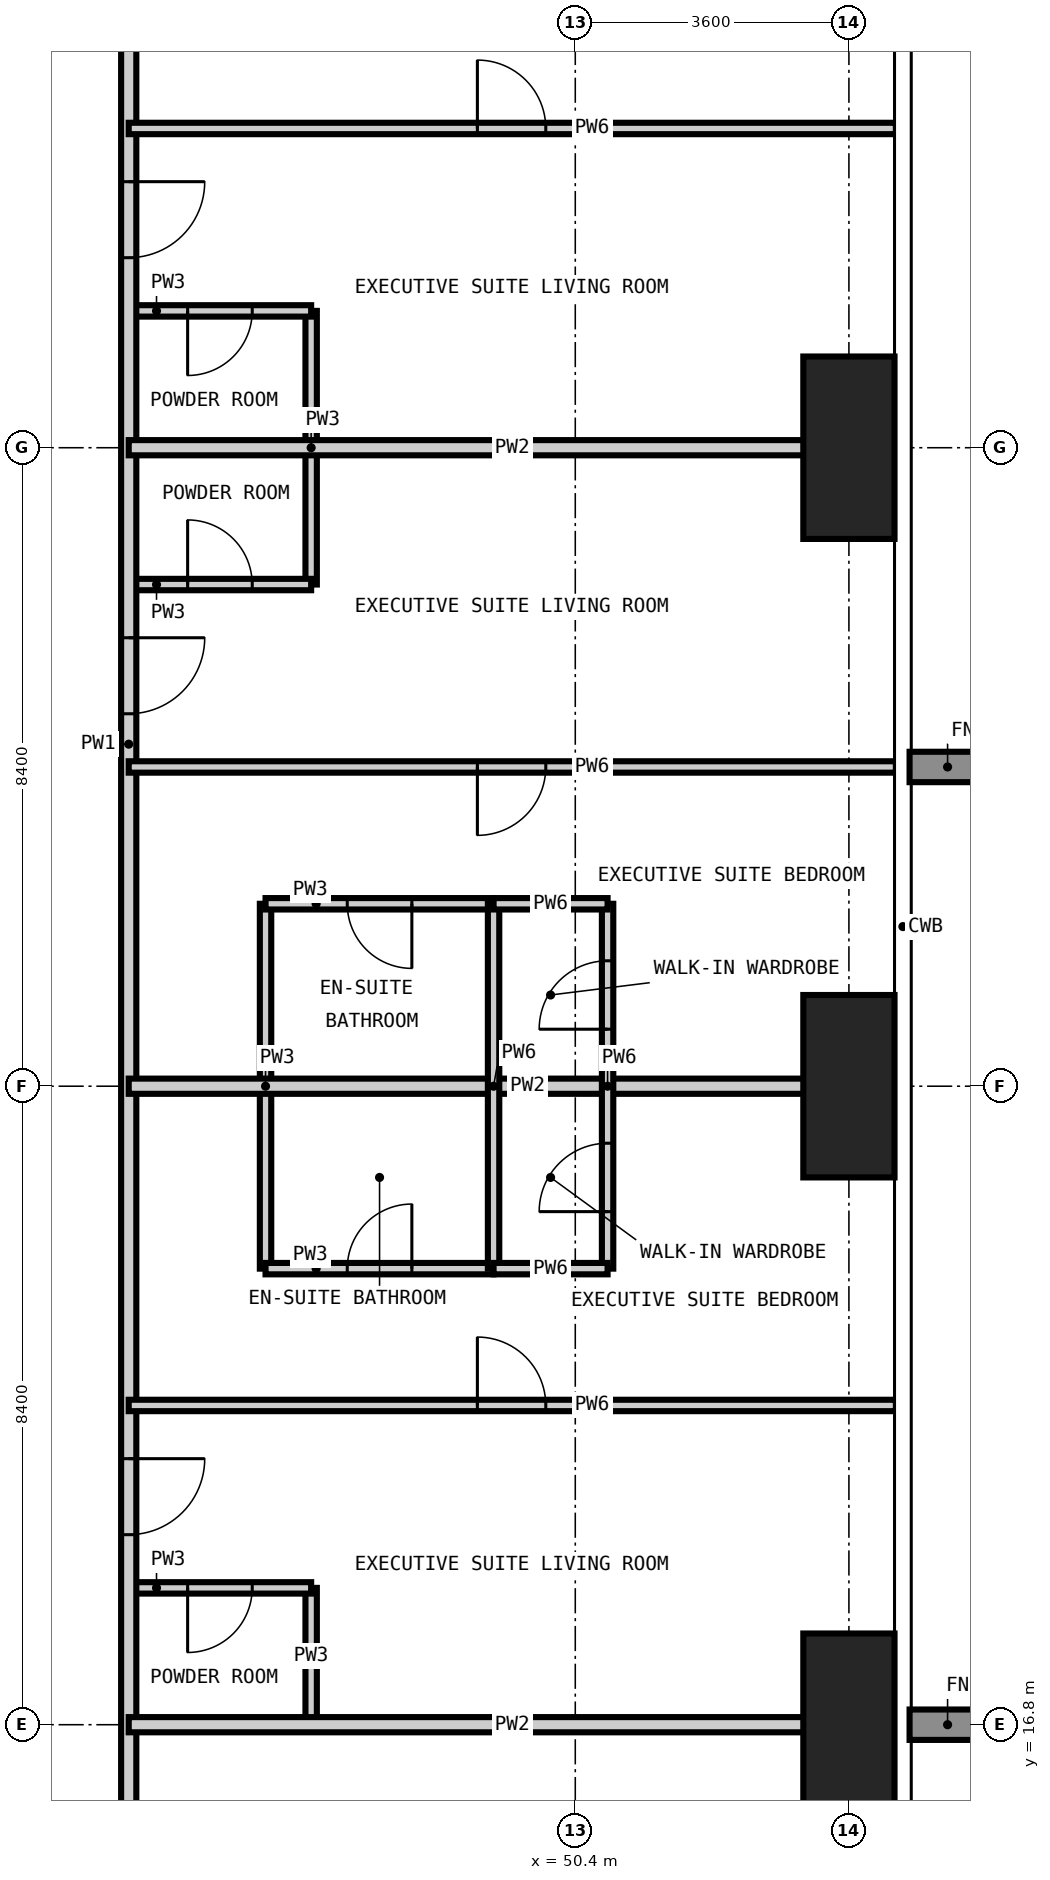
"""IFC4 building model, lengths in metres.
Left out: names, types, materials, properties, quantities, classifications, styles, units other than length and angle.
Written with IfcOpenShell. Run it as: python <this file> out.ifc"""

import sys

from ifc_helpers import new_model, si_unit, direction, frame, frame_2d, origin, origin_2d, place, context, subcontext, project, spatial, rectangle, extrude, element, fill, save


model = new_model("IFC4")
c1 = context("Model", 3, precision=1e-05, world=origin(), true_north=direction((0.0, 1.0)))
c2 = subcontext(c1, "Body", "Model", "MODEL_VIEW")
j1 = project(units=[si_unit("LENGTHUNIT", "METRE"), si_unit("PLANEANGLEUNIT", "RADIAN")], contexts=[c1])
p1 = place(None, origin())
s1 = spatial("IfcSite", under=j1, at=p1, CompositionType="ELEMENT")
p2 = place(p1, origin())
s2 = spatial("IfcBuilding", under=s1, at=p2, CompositionType="ELEMENT")
p3 = place(p2, frame((0.0, 0.0, 122.4)))
s3 = spatial("IfcBuildingStorey", under=s2, at=p3, CompositionType="ELEMENT", Elevation=122.4)
for number, where, z_axis, x_axis in (
    (1, (54.0, 16.8, -0.35), (0.0, 0.0, 1.0), (1.0, 0.0, 0.0)),
    (2, (54.0, 25.2, -0.35), (0.0, 0.0, 1.0), (1.0, 0.0, 0.0)),
    (3, (54.0, 33.6, -0.35), (0.0, 0.0, 1.0), (1.0, 0.0, 0.0)),
):
    element("IfcColumn", number, at=place(p3, frame(where, z_axis=z_axis, x_axis=x_axis)), inside=s3, PredefinedType="COLUMN", context=c2, shape_type="SweptSolid", body=[
        extrude(rectangle(XDim=1.2, YDim=2.4, at=origin_2d()), origin(), (0.0, 0.0, 1.0), 3.6),
    ])
p4 = place(p3, frame((46.325, 22.8, 0.0), z_axis=(0.0, 0.0, 1.0), x_axis=(0.0, 1.0, 0.0)))
e4 = element("IfcWall", 4, at=p4, inside=s3, PredefinedType="PARTITIONING", context=c2, shape_type="SweptSolid", body=[
    extrude(rectangle(XDim=4.8, YDim=0.15, at=frame_2d((2.4, 0.0))), origin(), (0.0, 0.0, 1.0), 3.25),
])
p5 = place(p3, frame((46.925, 16.8, 0.0), z_axis=(0.0, 0.0, 1.0), x_axis=(0.0, 1.0, 0.0)))
e5 = element("IfcWall", 5, at=p5, inside=s3, PredefinedType="PARTITIONING", context=c2, shape_type="SweptSolid", body=[
    extrude(rectangle(XDim=1.8, YDim=0.15, at=frame_2d((0.9, 0.0))), origin(), (0.0, 0.0, 1.0), 3.25),
])
p6 = place(p3, frame((46.925, 31.8, 0.0), z_axis=(0.0, 0.0, 1.0), x_axis=(0.0, 1.0, 0.0)))
e6 = element("IfcWall", 6, at=p6, inside=s3, PredefinedType="PARTITIONING", context=c2, shape_type="SweptSolid", body=[
    extrude(rectangle(XDim=3.6, YDim=0.15, at=frame_2d((1.8, 0.0))), origin(), (0.0, 0.0, 1.0), 3.25),
])
p7 = place(p3, frame((44.525, 18.6, 0.0), z_axis=(0.0, 0.0, 1.0), x_axis=(1.0, 0.0, 0.0)))
e7 = element("IfcWall", 7, at=p7, inside=s3, PredefinedType="PARTITIONING", context=c2, shape_type="SweptSolid", body=[
    extrude(rectangle(XDim=2.4, YDim=0.15, at=frame_2d((1.2, 0.0))), origin(), (0.0, 0.0, 1.0), 3.25),
])
p8 = place(p7, frame((0.775, 0.0, 0.0)))
e8 = element("IfcOpeningElement", 8, at=p8, cuts=e7, PredefinedType="OPENING", context=c2, shape_type="SweptSolid", body=[
    extrude(rectangle(XDim=0.85, YDim=2.1, at=frame_2d((0.425, 1.05))), frame((0.0, 0.085, 0.0), z_axis=(0.0, -1.0, 0.0), x_axis=(1.0, 0.0, 0.0)), (0.0, 0.0, 1.0), 0.17),
])
p9 = place(p3, frame((46.325, 22.8, 0.0), z_axis=(0.0, 0.0, 1.0), x_axis=(1.0, 0.0, 0.0)))
e9 = element("IfcWall", 9, at=p9, inside=s3, PredefinedType="PARTITIONING", context=c2, shape_type="SweptSolid", body=[
    extrude(rectangle(XDim=3.0, YDim=0.15, at=frame_2d((1.5, 0.0))), origin(), (0.0, 0.0, 1.0), 3.25),
])
p10 = place(p9, frame((1.075, 0.0, 0.0)))
e10 = element("IfcOpeningElement", 10, at=p10, cuts=e9, PredefinedType="OPENING", context=c2, shape_type="SweptSolid", body=[
    extrude(rectangle(XDim=0.85, YDim=2.1, at=frame_2d((0.425, 1.05))), frame((0.0, 0.085, 0.0), z_axis=(0.0, -1.0, 0.0), x_axis=(1.0, 0.0, 0.0)), (0.0, 0.0, 1.0), 0.17),
])
p11 = place(p3, frame((46.325, 27.6, 0.0), z_axis=(0.0, 0.0, 1.0), x_axis=(1.0, 0.0, 0.0)))
e11 = element("IfcWall", 11, at=p11, inside=s3, PredefinedType="PARTITIONING", context=c2, shape_type="SweptSolid", body=[
    extrude(rectangle(XDim=3.0, YDim=0.15, at=frame_2d((1.5, 0.0))), origin(), (0.0, 0.0, 1.0), 3.25),
])
p12 = place(p11, frame((1.075, 0.0, 0.0)))
e12 = element("IfcOpeningElement", 12, at=p12, cuts=e11, PredefinedType="OPENING", context=c2, shape_type="SweptSolid", body=[
    extrude(rectangle(XDim=0.85, YDim=2.1, at=frame_2d((0.425, 1.05))), frame((0.0, 0.085, 0.0), z_axis=(0.0, -1.0, 0.0), x_axis=(1.0, 0.0, 0.0)), (0.0, 0.0, 1.0), 0.17),
])
p13 = place(p3, frame((44.525, 31.8, 0.0), z_axis=(0.0, 0.0, 1.0), x_axis=(1.0, 0.0, 0.0)))
e13 = element("IfcWall", 13, at=p13, inside=s3, PredefinedType="PARTITIONING", context=c2, shape_type="SweptSolid", body=[
    extrude(rectangle(XDim=2.4, YDim=0.15, at=frame_2d((1.2, 0.0))), origin(), (0.0, 0.0, 1.0), 3.25),
])
p14 = place(p13, frame((0.775, 0.0, 0.0)))
e14 = element("IfcOpeningElement", 14, at=p14, cuts=e13, PredefinedType="OPENING", context=c2, shape_type="SweptSolid", body=[
    extrude(rectangle(XDim=0.85, YDim=2.1, at=frame_2d((0.425, 1.05))), frame((0.0, 0.085, 0.0), z_axis=(0.0, -1.0, 0.0), x_axis=(1.0, 0.0, 0.0)), (0.0, 0.0, 1.0), 0.17),
])
p15 = place(p3, frame((44.525, 35.4, 0.0), z_axis=(0.0, 0.0, 1.0), x_axis=(1.0, 0.0, 0.0)))
e15 = element("IfcWall", 15, at=p15, inside=s3, PredefinedType="PARTITIONING", context=c2, shape_type="SweptSolid", body=[
    extrude(rectangle(XDim=2.4, YDim=0.15, at=frame_2d((1.2, 0.0))), origin(), (0.0, 0.0, 1.0), 3.25),
])
p16 = place(p15, frame((0.775, 0.0, 0.0)))
e16 = element("IfcOpeningElement", 16, at=p16, cuts=e15, PredefinedType="OPENING", context=c2, shape_type="SweptSolid", body=[
    extrude(rectangle(XDim=0.85, YDim=2.1, at=frame_2d((0.425, 1.05))), frame((0.0, 0.085, 0.0), z_axis=(0.0, -1.0, 0.0), x_axis=(1.0, 0.0, 0.0)), (0.0, 0.0, 1.0), 0.17),
])
p17 = place(p3, frame((44.525, 45.725, 0.0), z_axis=(0.0, 0.0, 1.0), x_axis=(0.0, -1.0, 0.0)))
e17 = element("IfcWall", 17, at=p17, inside=s3, PredefinedType="PARTITIONING", context=c2, shape_type="SweptSolid", body=[
    extrude(rectangle(XDim=32.05, YDim=0.2, at=frame_2d((16.025, 0.0))), origin(), (0.0, 0.0, 1.0), 3.25),
])
p18 = place(p17, frame((25.425, 0.0, 0.0)))
e18 = element("IfcOpeningElement", 18, at=p18, cuts=e17, PredefinedType="OPENING", context=c2, shape_type="SweptSolid", body=[
    extrude(rectangle(XDim=1.0, YDim=2.2, at=frame_2d((0.5, 1.1))), frame((0.0, 0.11, 0.0), z_axis=(0.0, -1.0, 0.0), x_axis=(1.0, 0.0, 0.0)), (0.0, 0.0, 1.0), 0.22),
])
p19 = place(p17, frame((14.625, 0.0, 0.0)))
e19 = element("IfcOpeningElement", 19, at=p19, cuts=e17, PredefinedType="OPENING", context=c2, shape_type="SweptSolid", body=[
    extrude(rectangle(XDim=1.0, YDim=2.2, at=frame_2d((0.5, 1.1))), frame((0.0, 0.11, 0.0), z_axis=(0.0, -1.0, 0.0), x_axis=(1.0, 0.0, 0.0)), (0.0, 0.0, 1.0), 0.22),
])
p20 = place(p17, frame((8.625, 0.0, 0.0)))
e20 = element("IfcOpeningElement", 20, at=p20, cuts=e17, PredefinedType="OPENING", context=c2, shape_type="SweptSolid", body=[
    extrude(rectangle(XDim=1.0, YDim=2.2, at=frame_2d((0.5, 1.1))), frame((0.0, 0.11, 0.0), z_axis=(0.0, -1.0, 0.0), x_axis=(1.0, 0.0, 0.0)), (0.0, 0.0, 1.0), 0.22),
])
p21 = place(p17, frame((29.987, 0.0, 0.0)))
e21 = element("IfcOpeningElement", 21, at=p21, cuts=e17, PredefinedType="OPENING", context=c2, shape_type="SweptSolid", body=[
    extrude(rectangle(XDim=1.0, YDim=2.2, at=frame_2d((0.5, 1.1))), frame((0.0, 0.11, 0.0), z_axis=(0.0, -1.0, 0.0), x_axis=(1.0, 0.0, 0.0)), (0.0, 0.0, 1.0), 0.22),
])
p22 = place(p17, frame((1.363, 0.0, 0.0)))
e22 = element("IfcOpeningElement", 22, at=p22, cuts=e17, PredefinedType="OPENING", context=c2, shape_type="SweptSolid", body=[
    extrude(rectangle(XDim=1.0, YDim=2.2, at=frame_2d((0.5, 1.1))), frame((0.0, 0.11, 0.0), z_axis=(0.0, -1.0, 0.0), x_axis=(1.0, 0.0, 0.0)), (0.0, 0.0, 1.0), 0.22),
])
for number, where, z_axis, x_axis in (
    (23, (44.525, 16.8, 0.0), (0.0, 0.0, 1.0), (1.0, 0.0, 0.0)),
    (24, (44.525, 25.2, 0.0), (0.0, 0.0, 1.0), (1.0, 0.0, 0.0)),
    (25, (44.525, 33.6, 0.0), (0.0, 0.0, 1.0), (1.0, 0.0, 0.0)),
):
    element("IfcWall", number, at=place(p3, frame(where, z_axis=z_axis, x_axis=x_axis)), inside=s3, PredefinedType="PARTITIONING", context=c2, shape_type="SweptSolid", body=[
        extrude(rectangle(XDim=10.093, YDim=0.2, at=frame_2d((5.046, 0.0))), origin(), (0.0, 0.0, 1.0), 3.25),
    ])
p23 = place(p3, frame((49.325, 22.8, 0.0), z_axis=(0.0, 0.0, 1.0), x_axis=(0.0, 1.0, 0.0)))
e26 = element("IfcWall", 26, at=p23, inside=s3, PredefinedType="PARTITIONING", context=c2, shape_type="SweptSolid", body=[
    extrude(rectangle(XDim=4.8, YDim=0.15, at=frame_2d((2.4, 0.0))), origin(), (0.0, 0.0, 1.0), 3.25),
])
p24 = place(p3, frame((50.825, 22.8, 0.0), z_axis=(0.0, 0.0, 1.0), x_axis=(0.0, 1.0, 0.0)))
e27 = element("IfcWall", 27, at=p24, inside=s3, PredefinedType="PARTITIONING", context=c2, shape_type="SweptSolid", body=[
    extrude(rectangle(XDim=4.8, YDim=0.15, at=frame_2d((2.4, 0.0))), origin(), (0.0, 0.0, 1.0), 3.25),
])
p25 = place(p24, frame((0.75, 0.0, 0.0)))
e28 = element("IfcOpeningElement", 28, at=p25, cuts=e27, PredefinedType="OPENING", context=c2, shape_type="SweptSolid", body=[
    extrude(rectangle(XDim=0.9, YDim=2.1, at=frame_2d((0.45, 1.05))), frame((0.0, 0.085, 0.0), z_axis=(0.0, -1.0, 0.0), x_axis=(1.0, 0.0, 0.0)), (0.0, 0.0, 1.0), 0.17),
])
p26 = place(p24, frame((3.15, 0.0, 0.0)))
e29 = element("IfcOpeningElement", 29, at=p26, cuts=e27, PredefinedType="OPENING", context=c2, shape_type="SweptSolid", body=[
    extrude(rectangle(XDim=0.9, YDim=2.1, at=frame_2d((0.45, 1.05))), frame((0.0, 0.085, 0.0), z_axis=(0.0, -1.0, 0.0), x_axis=(1.0, 0.0, 0.0)), (0.0, 0.0, 1.0), 0.17),
])
p27 = place(p3, frame((44.525, 21.0, 0.0), z_axis=(0.0, 0.0, 1.0), x_axis=(1.0, 0.0, 0.0)))
e30 = element("IfcWall", 30, at=p27, inside=s3, PredefinedType="PARTITIONING", context=c2, shape_type="SweptSolid", body=[
    extrude(rectangle(XDim=10.093, YDim=0.15, at=frame_2d((5.046, 0.0))), origin(), (0.0, 0.0, 1.0), 3.25),
])
p28 = place(p27, frame((4.587, 0.0, 0.0)))
e31 = element("IfcOpeningElement", 31, at=p28, cuts=e30, PredefinedType="OPENING", context=c2, shape_type="SweptSolid", body=[
    extrude(rectangle(XDim=0.9, YDim=2.1, at=frame_2d((0.45, 1.05))), frame((0.0, 0.085, 0.0), z_axis=(0.0, -1.0, 0.0), x_axis=(1.0, 0.0, 0.0)), (0.0, 0.0, 1.0), 0.17),
])
for number, where, z_axis, x_axis in (
    (32, (49.325, 22.8, 0.0), (0.0, 0.0, 1.0), (1.0, 0.0, 0.0)),
    (33, (49.325, 27.6, 0.0), (0.0, 0.0, 1.0), (1.0, 0.0, 0.0)),
):
    element("IfcWall", number, at=place(p3, frame(where, z_axis=z_axis, x_axis=x_axis)), inside=s3, PredefinedType="PARTITIONING", context=c2, shape_type="SweptSolid", body=[
        extrude(rectangle(XDim=1.5, YDim=0.15, at=frame_2d((0.75, 0.0))), origin(), (0.0, 0.0, 1.0), 3.25),
    ])
p29 = place(p3, frame((44.525, 29.4, 0.0), z_axis=(0.0, 0.0, 1.0), x_axis=(1.0, 0.0, 0.0)))
e34 = element("IfcWall", 34, at=p29, inside=s3, PredefinedType="PARTITIONING", context=c2, shape_type="SweptSolid", body=[
    extrude(rectangle(XDim=10.093, YDim=0.15, at=frame_2d((5.046, 0.0))), origin(), (0.0, 0.0, 1.0), 3.25),
])
p30 = place(p29, frame((4.587, 0.0, 0.0)))
e35 = element("IfcOpeningElement", 35, at=p30, cuts=e34, PredefinedType="OPENING", context=c2, shape_type="SweptSolid", body=[
    extrude(rectangle(XDim=0.9, YDim=2.1, at=frame_2d((0.45, 1.05))), frame((0.0, 0.085, 0.0), z_axis=(0.0, -1.0, 0.0), x_axis=(1.0, 0.0, 0.0)), (0.0, 0.0, 1.0), 0.17),
])
p31 = place(p3, frame((44.525, 37.8, 0.0), z_axis=(0.0, 0.0, 1.0), x_axis=(1.0, 0.0, 0.0)))
e36 = element("IfcWall", 36, at=p31, inside=s3, PredefinedType="PARTITIONING", context=c2, shape_type="SweptSolid", body=[
    extrude(rectangle(XDim=10.093, YDim=0.15, at=frame_2d((5.046, 0.0))), origin(), (0.0, 0.0, 1.0), 3.25),
])
p32 = place(p31, frame((4.587, 0.0, 0.0)))
e37 = element("IfcOpeningElement", 37, at=p32, cuts=e36, PredefinedType="OPENING", context=c2, shape_type="SweptSolid", body=[
    extrude(rectangle(XDim=0.9, YDim=2.1, at=frame_2d((0.45, 1.05))), frame((0.0, 0.085, 0.0), z_axis=(0.0, -1.0, 0.0), x_axis=(1.0, 0.0, 0.0)), (0.0, 0.0, 1.0), 0.17),
])
p33 = place(p18, origin())
e38 = element("IfcDoor", 38, at=p33, inside=s3, OperationType="SINGLE_SWING_LEFT", PredefinedType="DOOR", context=c2, shape_type="SweptSolid", body=[
    extrude(rectangle(XDim=1.0, YDim=2.2, at=frame_2d((0.5, 1.1))), frame((0.0, 0.025, 0.0), z_axis=(0.0, -1.0, 0.0), x_axis=(1.0, 0.0, 0.0)), (0.0, 0.0, 1.0), 0.05),
])
fill(e18, e38)
p34 = place(p8, frame((0.85, 0.0, 0.0), z_axis=(0.0, 0.0, 1.0), x_axis=(-1.0, 0.0, 0.0)))
e39 = element("IfcDoor", 39, at=p34, inside=s3, OperationType="SINGLE_SWING_RIGHT", PredefinedType="DOOR", context=c2, shape_type="SweptSolid", body=[
    extrude(rectangle(XDim=0.85, YDim=2.1, at=frame_2d((0.425, 1.05))), frame((0.0, 0.025, 0.0), z_axis=(0.0, -1.0, 0.0), x_axis=(1.0, 0.0, 0.0)), (0.0, 0.0, 1.0), 0.05),
])
fill(e8, e39)
p35 = place(p28, origin())
e40 = element("IfcDoor", 40, at=p35, inside=s3, OperationType="SINGLE_SWING_LEFT", PredefinedType="DOOR", context=c2, shape_type="SweptSolid", body=[
    extrude(rectangle(XDim=0.9, YDim=2.1, at=frame_2d((0.45, 1.05))), frame((0.0, 0.025, 0.0), z_axis=(0.0, -1.0, 0.0), x_axis=(1.0, 0.0, 0.0)), (0.0, 0.0, 1.0), 0.05),
])
fill(e31, e40)
p36 = place(p10, origin())
e41 = element("IfcDoor", 41, at=p36, inside=s3, OperationType="SINGLE_SWING_RIGHT", PredefinedType="DOOR", context=c2, shape_type="SweptSolid", body=[
    extrude(rectangle(XDim=0.85, YDim=2.1, at=frame_2d((0.425, 1.05))), frame((0.0, 0.025, 0.0), z_axis=(0.0, -1.0, 0.0), x_axis=(1.0, 0.0, 0.0)), (0.0, 0.0, 1.0), 0.05),
])
fill(e10, e41)
p37 = place(p25, origin())
e42 = element("IfcDoor", 42, at=p37, inside=s3, OperationType="SINGLE_SWING_LEFT", PredefinedType="DOOR", context=c2, shape_type="SweptSolid", body=[
    extrude(rectangle(XDim=0.9, YDim=2.1, at=frame_2d((0.45, 1.05))), frame((0.0, 0.025, 0.0), z_axis=(0.0, -1.0, 0.0), x_axis=(1.0, 0.0, 0.0)), (0.0, 0.0, 1.0), 0.05),
])
fill(e28, e42)
p38 = place(p19, origin())
e43 = element("IfcDoor", 43, at=p38, inside=s3, OperationType="SINGLE_SWING_LEFT", PredefinedType="DOOR", context=c2, shape_type="SweptSolid", body=[
    extrude(rectangle(XDim=1.0, YDim=2.2, at=frame_2d((0.5, 1.1))), frame((0.0, 0.025, 0.0), z_axis=(0.0, -1.0, 0.0), x_axis=(1.0, 0.0, 0.0)), (0.0, 0.0, 1.0), 0.05),
])
fill(e19, e43)
p39 = place(p14, origin())
e44 = element("IfcDoor", 44, at=p39, inside=s3, OperationType="SINGLE_SWING_LEFT", PredefinedType="DOOR", context=c2, shape_type="SweptSolid", body=[
    extrude(rectangle(XDim=0.85, YDim=2.1, at=frame_2d((0.425, 1.05))), frame((0.0, 0.025, 0.0), z_axis=(0.0, -1.0, 0.0), x_axis=(1.0, 0.0, 0.0)), (0.0, 0.0, 1.0), 0.05),
])
fill(e14, e44)
p40 = place(p30, frame((0.9, 0.0, 0.0), z_axis=(0.0, 0.0, 1.0), x_axis=(-1.0, 0.0, 0.0)))
e45 = element("IfcDoor", 45, at=p40, inside=s3, OperationType="SINGLE_SWING_RIGHT", PredefinedType="DOOR", context=c2, shape_type="SweptSolid", body=[
    extrude(rectangle(XDim=0.9, YDim=2.1, at=frame_2d((0.45, 1.05))), frame((0.0, 0.025, 0.0), z_axis=(0.0, -1.0, 0.0), x_axis=(1.0, 0.0, 0.0)), (0.0, 0.0, 1.0), 0.05),
])
fill(e35, e45)
p41 = place(p12, frame((0.85, 0.0, 0.0), z_axis=(0.0, 0.0, 1.0), x_axis=(-1.0, 0.0, 0.0)))
e46 = element("IfcDoor", 46, at=p41, inside=s3, OperationType="SINGLE_SWING_LEFT", PredefinedType="DOOR", context=c2, shape_type="SweptSolid", body=[
    extrude(rectangle(XDim=0.85, YDim=2.1, at=frame_2d((0.425, 1.05))), frame((0.0, 0.025, 0.0), z_axis=(0.0, -1.0, 0.0), x_axis=(1.0, 0.0, 0.0)), (0.0, 0.0, 1.0), 0.05),
])
fill(e12, e46)
p42 = place(p26, origin())
e47 = element("IfcDoor", 47, at=p42, inside=s3, OperationType="SINGLE_SWING_LEFT", PredefinedType="DOOR", context=c2, shape_type="SweptSolid", body=[
    extrude(rectangle(XDim=0.9, YDim=2.1, at=frame_2d((0.45, 1.05))), frame((0.0, 0.025, 0.0), z_axis=(0.0, -1.0, 0.0), x_axis=(1.0, 0.0, 0.0)), (0.0, 0.0, 1.0), 0.05),
])
fill(e29, e47)
p43 = place(p20, origin())
e48 = element("IfcDoor", 48, at=p43, inside=s3, OperationType="SINGLE_SWING_LEFT", PredefinedType="DOOR", context=c2, shape_type="SweptSolid", body=[
    extrude(rectangle(XDim=1.0, YDim=2.2, at=frame_2d((0.5, 1.1))), frame((0.0, 0.025, 0.0), z_axis=(0.0, -1.0, 0.0), x_axis=(1.0, 0.0, 0.0)), (0.0, 0.0, 1.0), 0.05),
])
fill(e20, e48)
p44 = place(p16, frame((0.85, 0.0, 0.0), z_axis=(0.0, 0.0, 1.0), x_axis=(-1.0, 0.0, 0.0)))
e49 = element("IfcDoor", 49, at=p44, inside=s3, OperationType="SINGLE_SWING_RIGHT", PredefinedType="DOOR", context=c2, shape_type="SweptSolid", body=[
    extrude(rectangle(XDim=0.85, YDim=2.1, at=frame_2d((0.425, 1.05))), frame((0.0, 0.025, 0.0), z_axis=(0.0, -1.0, 0.0), x_axis=(1.0, 0.0, 0.0)), (0.0, 0.0, 1.0), 0.05),
])
fill(e16, e49)
p45 = place(p32, origin())
e50 = element("IfcDoor", 50, at=p45, inside=s3, OperationType="SINGLE_SWING_LEFT", PredefinedType="DOOR", context=c2, shape_type="SweptSolid", body=[
    extrude(rectangle(XDim=0.9, YDim=2.1, at=frame_2d((0.45, 1.05))), frame((0.0, 0.025, 0.0), z_axis=(0.0, -1.0, 0.0), x_axis=(1.0, 0.0, 0.0)), (0.0, 0.0, 1.0), 0.05),
])
fill(e37, e50)
save(model, sys.argv[1])
